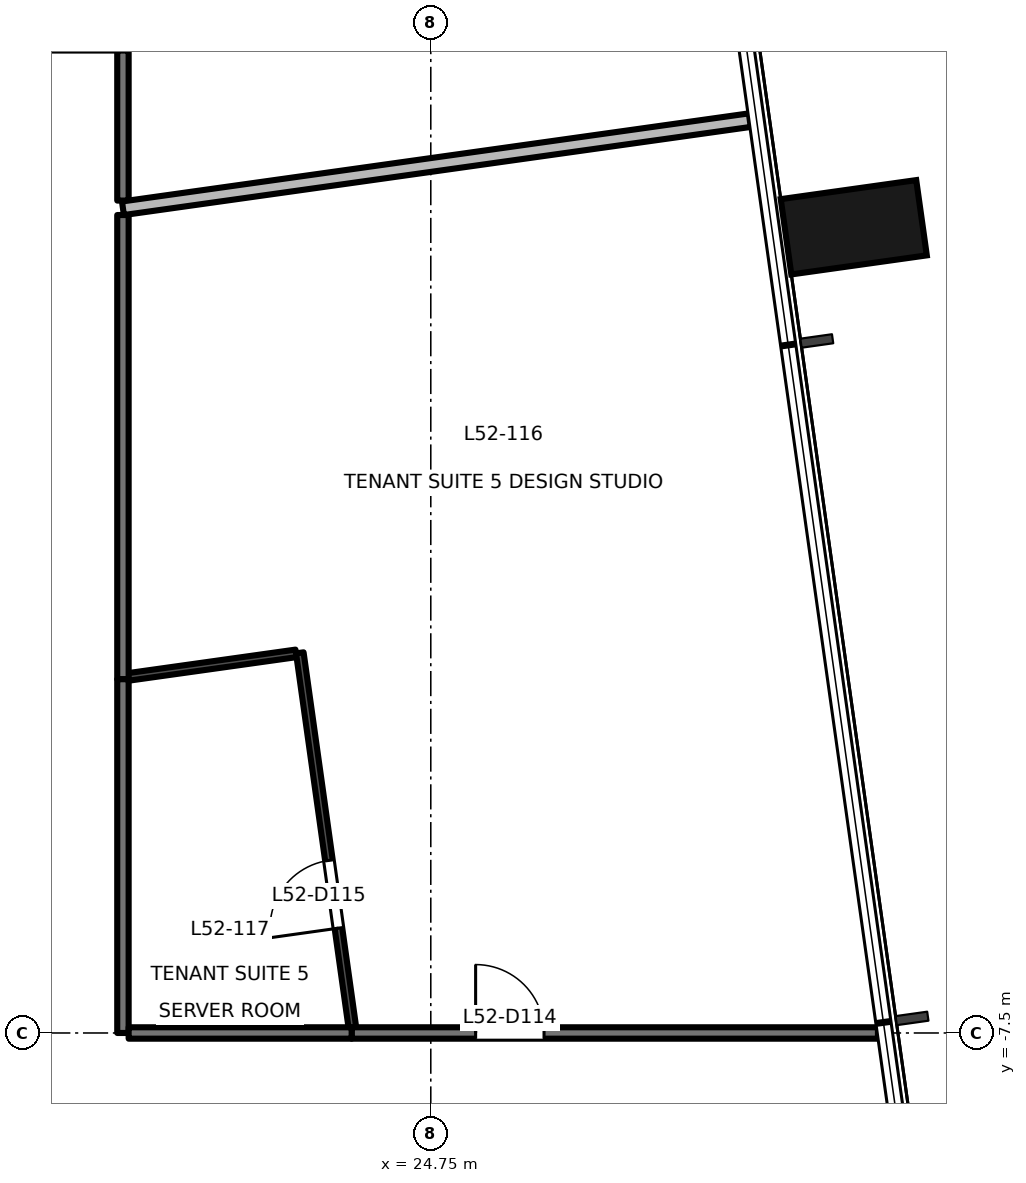
"""IFC4 building model, lengths in metres.
Left out: names, types, materials, properties, quantities, classifications, styles, units other than length and angle.
Written with IfcOpenShell. Run it as: python <this file> out.ifc"""

import sys

from ifc_helpers import new_model, si_unit, direction, frame, frame_2d, origin, origin_2d, place, context, subcontext, project, spatial, rectangle, extrude, element, fill, save


model = new_model("IFC4")
c1 = context("Model", 3, precision=1e-05, world=origin(), true_north=direction((0.0, 1.0)))
c2 = subcontext(c1, "Body", "Model", "MODEL_VIEW")
j1 = project(units=[si_unit("LENGTHUNIT", "METRE"), si_unit("PLANEANGLEUNIT", "RADIAN")], contexts=[c1])
p1 = place(None, origin())
s1 = spatial("IfcSite", under=j1, at=p1, CompositionType="ELEMENT")
p2 = place(p1, origin())
s2 = spatial("IfcBuilding", under=s1, at=p2, CompositionType="ELEMENT")
p3 = place(p2, frame((0.0, 0.0, 229.1)))
s3 = spatial("IfcBuildingStorey", under=s2, at=p3, CompositionType="ELEMENT", Elevation=229.1)
p4 = place(p3, frame((30.315, 3.1, -0.2), z_axis=(0.0, 0.0, 1.0), x_axis=(-0.139190384377, 0.990265639562, 0.0)))
e1 = element("IfcColumn", 1, at=p4, inside=s3, PredefinedType="COLUMN", context=c2, shape_type="SweptSolid", body=[
    extrude(rectangle(XDim=1.0, YDim=1.8, at=origin_2d()), origin(), (0.0, 0.0, 1.0), 3.9),
])
p5 = place(p3, frame((20.7, 3.261, 0.0), z_axis=(0.0, 0.0, 1.0), x_axis=(0.0, -1.0, 0.0)))
e2 = element("IfcWall", 2, at=p5, inside=s3, PredefinedType="PARTITIONING", context=c2, shape_type="SweptSolid", body=[
    extrude(rectangle(XDim=6.107, YDim=0.15, at=frame_2d((3.053, 0.0))), origin(), (0.0, 0.0, 1.0), 3.15),
])
p6 = place(p3, frame((23.709, -7.5, 0.0), z_axis=(0.0, 0.0, 1.0), x_axis=(1.0, 0.0, 0.0)))
e3 = element("IfcWall", 3, at=p6, inside=s3, PredefinedType="PARTITIONING", context=c2, shape_type="SweptSolid", body=[
    extrude(rectangle(XDim=6.924, YDim=0.15, at=frame_2d((3.462, 0.0))), origin(), (0.0, 0.0, 1.0), 3.7),
])
p7 = place(p6, frame((1.631, 0.0, 0.0)))
e4 = element("IfcOpeningElement", 4, at=p7, cuts=e3, PredefinedType="OPENING", context=c2, shape_type="SweptSolid", body=[
    extrude(rectangle(XDim=0.9, YDim=2.1, at=frame_2d((0.45, 1.05))), frame((0.0, 0.085, 0.0), z_axis=(0.0, -1.0, 0.0), x_axis=(1.0, 0.0, 0.0)), (0.0, 0.0, 1.0), 0.171),
])
p8 = place(p3, frame((20.7, -2.846, 0.0), z_axis=(0.0, 0.0, 1.0), x_axis=(0.0, -1.0, 0.0)))
e5 = element("IfcWall", 5, at=p8, inside=s3, PredefinedType="PARTITIONING", context=c2, shape_type="SweptSolid", body=[
    extrude(rectangle(XDim=4.654, YDim=0.15, at=frame_2d((2.327, 0.0))), origin(), (0.0, 0.0, 1.0), 3.1),
])
p9 = place(p3, frame((20.775, -7.5, 0.0), z_axis=(0.0, 0.0, 1.0), x_axis=(1.0, 0.0, 0.0)))
e6 = element("IfcWall", 6, at=p9, inside=s3, PredefinedType="PARTITIONING", context=c2, shape_type="SweptSolid", body=[
    extrude(rectangle(XDim=2.934, YDim=0.15, at=frame_2d((1.467, 0.0))), origin(), (0.0, 0.0, 1.0), 3.7),
])
p10 = place(p3, frame((20.7, 5.425, 0.0), z_axis=(0.0, 0.0, 1.0), x_axis=(0.0, -1.0, 0.0)))
e7 = element("IfcWall", 7, at=p10, inside=s3, PredefinedType="PARTITIONING", context=c2, shape_type="SweptSolid", body=[
    extrude(rectangle(XDim=1.974, YDim=0.15, at=frame_2d((0.987, 0.0))), origin(), (0.0, 0.0, 1.0), 3.15),
])
p11 = place(p3, frame((22.977, -2.506, 0.0), z_axis=(0.0, 0.0, 1.0), x_axis=(-0.990307451449, -0.138892590173, 0.0)))
e8 = element("IfcWall", 8, at=p11, inside=s3, PredefinedType="PARTITIONING", context=c2, shape_type="SweptSolid", body=[
    extrude(rectangle(XDim=2.231, YDim=0.1, at=frame_2d((1.115, 0.0))), origin(), (0.0, 0.0, 1.0), 3.7),
])
p12 = place(p3, frame((23.719, -7.432, 0.0), z_axis=(0.0, 0.0, 1.0), x_axis=(-0.138902614834, 0.990306045418, 0.0)))
e9 = element("IfcWall", 9, at=p12, inside=s3, PredefinedType="PARTITIONING", context=c2, shape_type="SweptSolid", body=[
    extrude(rectangle(XDim=4.981, YDim=0.1, at=frame_2d((2.491, 0.0))), origin(), (0.0, 0.0, 1.0), 3.1),
])
p13 = place(p12, frame((1.324, 0.0, 0.0)))
e10 = element("IfcOpeningElement", 10, at=p13, cuts=e9, PredefinedType="OPENING", context=c2, shape_type="SweptSolid", body=[
    extrude(rectangle(XDim=0.9, YDim=2.1, at=frame_2d((0.45, 1.05))), frame((0.0, 0.061, 0.0), z_axis=(0.0, -1.0, 0.0), x_axis=(1.0, 0.0, 0.0)), (0.0, 0.0, 1.0), 0.121),
])
p14 = place(p3, frame((20.7, 3.35, 0.0), z_axis=(0.0, 0.0, 1.0), x_axis=(0.990269965101, 0.139159606996, 0.0)))
e11 = element("IfcWall", 11, at=p14, inside=s3, PredefinedType="PARTITIONING", context=c2, shape_type="SweptSolid", body=[
    extrude(rectangle(XDim=8.328, YDim=0.18, at=frame_2d((4.164, 0.0))), origin(), (0.0, 0.0, 1.0), 3.15),
])
p15 = place(p7, origin())
e12 = element("IfcDoor", 12, at=p15, inside=s3, OperationType="SINGLE_SWING_LEFT", PredefinedType="DOOR", context=c2, shape_type="SweptSolid", body=[
    extrude(rectangle(XDim=0.9, YDim=2.1, at=frame_2d((0.45, 1.05))), frame((0.0, 0.025, 0.0), z_axis=(0.0, -1.0, 0.0), x_axis=(1.0, 0.0, 0.0)), (0.0, 0.0, 1.0), 0.05),
])
fill(e4, e12)
p16 = place(p13, origin())
e13 = element("IfcDoor", 13, at=p16, inside=s3, OperationType="SINGLE_SWING_LEFT", PredefinedType="DOOR", context=c2, shape_type="SweptSolid", body=[
    extrude(rectangle(XDim=0.9, YDim=2.1, at=frame_2d((0.45, 1.05))), frame((0.0, 0.025, 0.0), z_axis=(0.0, -1.0, 0.0), x_axis=(1.0, 0.0, 0.0)), (0.0, 0.0, 1.0), 0.05),
])
fill(e10, e13)
save(model, sys.argv[1])
